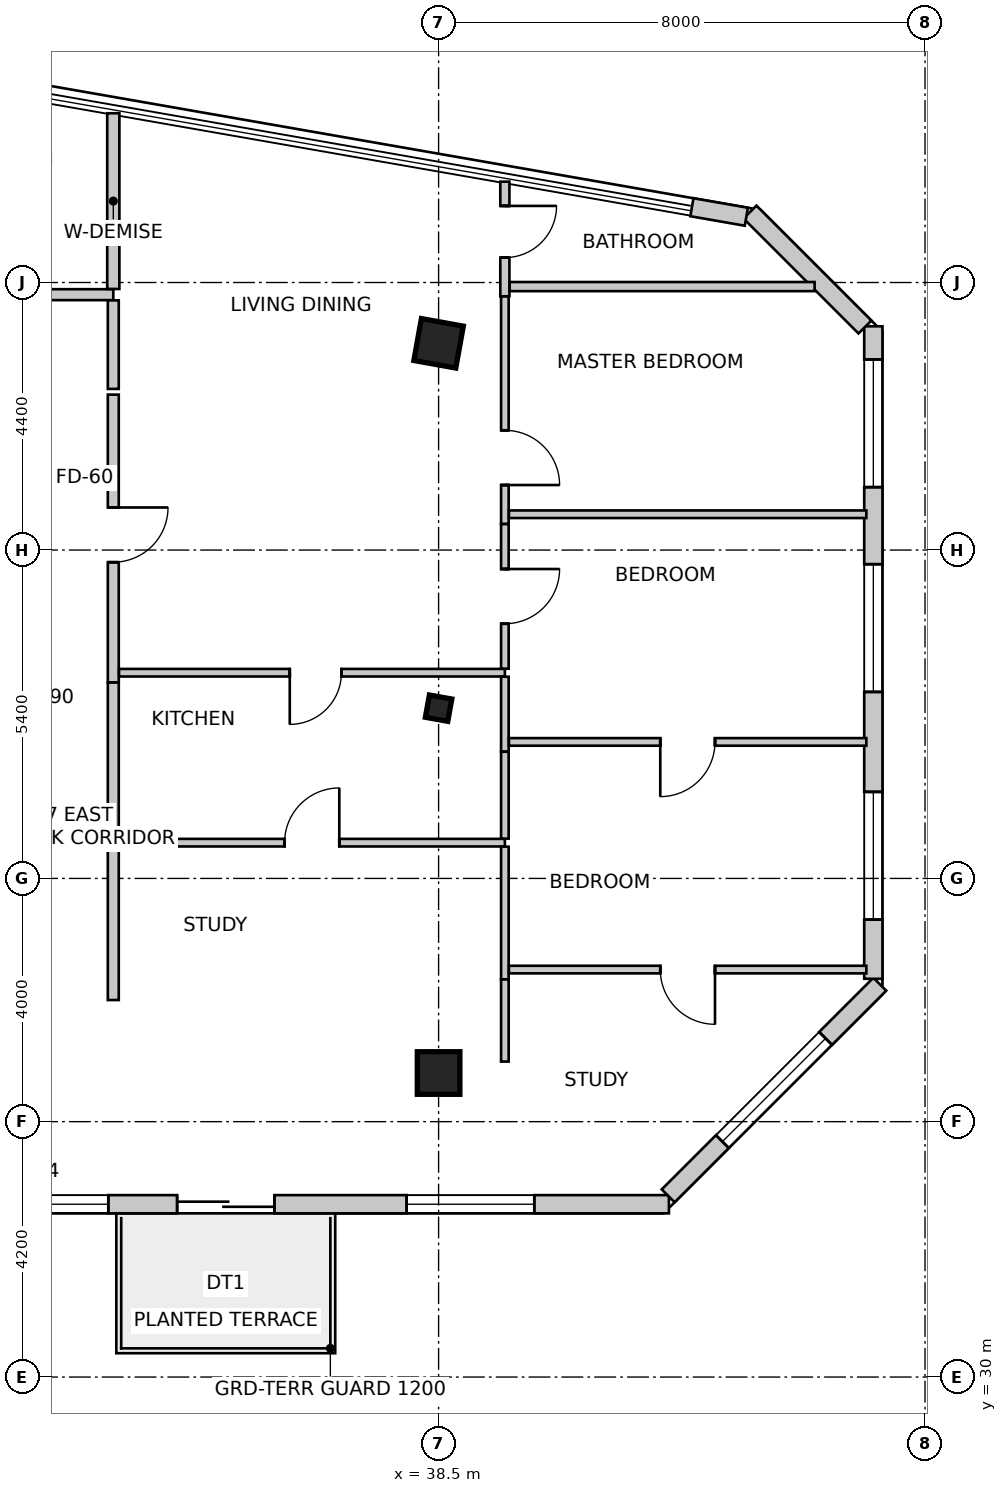
"""IFC4 building model, lengths in metres.
Left out: names, types, materials, properties, quantities, classifications, styles, units other than length and angle.
Written with IfcOpenShell. Run it as: python <this file> out.ifc"""

import sys

from ifc_helpers import new_model, si_unit, direction, frame, frame_2d, origin, origin_2d, place, context, subcontext, project, spatial, rectangle, i_section, extrude, source, transform, mapped, element, fill, save


model = new_model("IFC4")
c1 = context("Model", 3, precision=1e-05, world=origin(), true_north=direction((0.0, 1.0)))
c2 = subcontext(c1, "Body", "Model", "MODEL_VIEW")
j1 = project(units=[si_unit("LENGTHUNIT", "METRE"), si_unit("PLANEANGLEUNIT", "RADIAN")], contexts=[c1])
p1 = place(None, origin())
s1 = spatial("IfcSite", under=j1, at=p1, CompositionType="ELEMENT")
p2 = place(p1, origin())
s2 = spatial("IfcBuilding", under=s1, at=p2, CompositionType="ELEMENT")
p3 = place(p2, frame((0.0, 0.0, 225.4)))
s3 = spatial("IfcBuildingStorey", under=s2, at=p3, CompositionType="ELEMENT", Elevation=225.4)
m1 = source(origin(), c2, "Body", "SweptSolid", [
    extrude(rectangle(XDim=0.7, YDim=0.7, at=origin_2d()), origin(), (0.0, 0.0, 1.0), 3.5),
])
for number, where, z_axis, x_axis in (
    (1, (38.5, 47.0, 0.0), (0.0, 0.0, 1.0), (0.984, -0.177, 0.0)),
    (2, (38.5, 35.0, 0.0), (0.0, 0.0, 1.0), (1.0, 0.0, 0.0)),
):
    element("IfcColumn", number, at=place(p3, frame(where, z_axis=z_axis, x_axis=x_axis)), inside=s3, PredefinedType="COLUMN", context=c2, shape_type="MappedRepresentation", body=[
        mapped(m1, transform((0.0, 0.0, 0.0), scale=1.0)),
    ])
m2 = source(origin(), c2, "Body", "SweptSolid", [
    extrude(i_section(OverallWidth=0.374, OverallDepth=0.372, WebThickness=0.016, FlangeThickness=0.026, FilletRadius=0.015, at=origin_2d()), origin(), (0.0, 0.0, 1.0), 3.5),
])
p4 = place(p3, frame((38.5, 41.0, 0.0), z_axis=(0.0, 0.0, 1.0), x_axis=(0.984195607969, -0.17708474032, 0.0)))
e3 = element("IfcColumn", 3, at=p4, inside=s3, PredefinedType="COLUMN", context=c2, shape_type="MappedRepresentation", body=[
    mapped(m2, transform((0.0, 0.0, 0.0), scale=1.0)),
])
p5 = place(p3, frame((29.797, 32.842, 0.0), z_axis=(0.0, 0.0, 1.0), x_axis=(1.0, 0.0, 0.0)))
e4 = element("IfcWall", 4, at=p5, inside=s3, PredefinedType="SOLIDWALL", context=c2, shape_type="SweptSolid", body=[
    extrude(rectangle(XDim=12.491, YDim=0.3, at=frame_2d((6.245, 0.0))), origin(), (0.0, 0.0, 1.0), 3.25),
])
m3 = source(origin(), c2, "Body", "SweptSolid", [
    extrude(rectangle(XDim=1.6, YDim=2.15, at=frame_2d((0.8, 1.075))), frame((0.0, 0.16, 0.0), z_axis=(0.0, -1.0, 0.0), x_axis=(1.0, 0.0, 0.0)), (0.0, 0.0, 1.0), 0.32),
])
p6 = place(p5, frame((4.403, 0.0, 0.0)))
e5 = element("IfcOpeningElement", 5, at=p6, cuts=e4, PredefinedType="OPENING", context=c2, shape_type="MappedRepresentation", body=[
    mapped(m3, transform((0.0, 0.0, 0.0), scale=1.0)),
])
m4 = source(origin(), c2, "Body", "SweptSolid", [
    extrude(rectangle(XDim=2.1, YDim=2.0, at=frame_2d((1.05, 1.0))), frame((0.0, 0.16, 0.0), z_axis=(0.0, -1.0, 0.0), x_axis=(1.0, 0.0, 0.0)), (0.0, 0.0, 1.0), 0.32),
])
p7 = place(p5, frame((1.171, 0.0, 0.85)))
e6 = element("IfcOpeningElement", 6, at=p7, cuts=e4, PredefinedType="OPENING", context=c2, shape_type="MappedRepresentation", body=[
    mapped(m4, transform((0.0, 0.0, 0.0), scale=1.0)),
])
p8 = place(p5, frame((8.177, 0.0, 0.85)))
e7 = element("IfcOpeningElement", 7, at=p8, cuts=e4, PredefinedType="OPENING", context=c2, shape_type="MappedRepresentation", body=[
    mapped(m4, transform((0.0, 0.0, 0.0), scale=1.0)),
])
p9 = place(p3, frame((42.276, 32.98, 0.0), z_axis=(0.0, 0.0, 1.0), x_axis=(0.707106781187, 0.707106781187, 0.0)))
e8 = element("IfcWall", 8, at=p9, inside=s3, PredefinedType="SOLIDWALL", context=c2, shape_type="SweptSolid", body=[
    extrude(rectangle(XDim=4.922, YDim=0.3, at=frame_2d((2.461, 0.0))), origin(), (0.0, 0.0, 1.0), 3.25),
])
m5 = source(origin(), c2, "Body", "SweptSolid", [
    extrude(rectangle(XDim=2.4, YDim=2.2, at=frame_2d((1.2, 1.1))), frame((0.0, 0.16, 0.0), z_axis=(0.0, -1.0, 0.0), x_axis=(1.0, 0.0, 0.0)), (0.0, 0.0, 1.0), 0.32),
])
p10 = place(p9, frame((1.261, 0.0, 0.85)))
e9 = element("IfcOpeningElement", 9, at=p10, cuts=e8, PredefinedType="OPENING", context=c2, shape_type="MappedRepresentation", body=[
    mapped(m5, transform((0.0, 0.0, 0.0), scale=1.0)),
])
p11 = place(p3, frame((45.65, 36.549, 0.0), z_axis=(0.0, 0.0, 1.0), x_axis=(0.0, 1.0, 0.0)))
e10 = element("IfcWall", 10, at=p11, inside=s3, PredefinedType="SOLIDWALL", context=c2, shape_type="SweptSolid", body=[
    extrude(rectangle(XDim=10.73, YDim=0.3, at=frame_2d((5.365, 0.0))), origin(), (0.0, 0.0, 1.0), 3.25),
])
p12 = place(p11, frame((0.974, 0.0, 0.85)))
e11 = element("IfcOpeningElement", 11, at=p12, cuts=e10, PredefinedType="OPENING", context=c2, shape_type="MappedRepresentation", body=[
    mapped(m4, transform((0.0, 0.0, 0.0), scale=1.0)),
])
p13 = place(p11, frame((4.718, 0.0, 0.85)))
e12 = element("IfcOpeningElement", 12, at=p13, cuts=e10, PredefinedType="OPENING", context=c2, shape_type="MappedRepresentation", body=[
    mapped(m4, transform((0.0, 0.0, 0.0), scale=1.0)),
])
p14 = place(p11, frame((8.085, 0.0, 0.85)))
e13 = element("IfcOpeningElement", 13, at=p14, cuts=e10, PredefinedType="OPENING", context=c2, shape_type="MappedRepresentation", body=[
    mapped(m4, transform((0.0, 0.0, 0.0), scale=1.0)),
])
p15 = place(p3, frame((45.512, 47.268, 0.0), z_axis=(0.0, 0.0, 1.0), x_axis=(-0.707106781187, 0.707106781187, 0.0)))
e14 = element("IfcWall", 14, at=p15, inside=s3, PredefinedType="SOLIDWALL", context=c2, shape_type="SweptSolid", body=[
    extrude(rectangle(XDim=2.674, YDim=0.3, at=frame_2d((1.337, 0.0))), origin(), (0.0, 0.0, 1.0), 3.25),
])
p16 = place(p3, frame((43.561, 49.081, 0.0), z_axis=(0.0, 0.0, 1.0), x_axis=(-0.985063518612, 0.172191359539, 0.0)))
e15 = element("IfcWall", 15, at=p16, inside=s3, PredefinedType="SOLIDWALL", context=c2, shape_type="SweptSolid", body=[
    extrude(rectangle(XDim=0.909, YDim=0.3, at=frame_2d((0.455, 0.0))), origin(), (0.0, 0.0, 1.0), 3.25),
])
p17 = place(p3, frame((28.362, 47.8, 0.0), z_axis=(0.0, 0.0, 1.0), x_axis=(1.0, 0.0, 0.0)))
e16 = element("IfcWall", 16, at=p17, inside=s3, PredefinedType="PARTITIONING", context=c2, shape_type="SweptSolid", body=[
    extrude(rectangle(XDim=4.788, YDim=0.18, at=frame_2d((2.394, 0.0))), origin(), (0.0, 0.0, 1.0), 2.688),
])
m6 = source(origin(), c2, "Body", "SweptSolid", [
    extrude(rectangle(XDim=0.85, YDim=2.15, at=frame_2d((0.425, 1.075))), frame((0.0, 0.1, 0.0), z_axis=(0.0, -1.0, 0.0), x_axis=(1.0, 0.0, 0.0)), (0.0, 0.0, 1.0), 0.2),
])
p18 = place(p17, frame((0.401, 0.0, 0.0)))
e17 = element("IfcOpeningElement", 17, at=p18, cuts=e16, PredefinedType="OPENING", context=c2, shape_type="MappedRepresentation", body=[
    mapped(m6, transform((0.0, 0.0, 0.0), scale=1.0)),
])
p19 = place(p3, frame((33.15, 47.706, 0.0), z_axis=(0.0, 0.0, 1.0), x_axis=(0.0, -1.0, 0.0)))
e18 = element("IfcWall", 18, at=p19, inside=s3, PredefinedType="PARTITIONING", context=c2, shape_type="SweptSolid", body=[
    extrude(rectangle(XDim=1.456, YDim=0.18, at=frame_2d((0.728, 0.0))), origin(), (0.0, 0.0, 1.0), 2.835),
])
p20 = place(p3, frame((33.15, 38.948, 0.0), z_axis=(0.0, 0.0, 1.0), x_axis=(0.0, -1.0, 0.0)))
e19 = element("IfcWall", 19, at=p20, inside=s3, PredefinedType="PARTITIONING", context=c2, shape_type="SweptSolid", body=[
    extrude(rectangle(XDim=2.748, YDim=0.18, at=frame_2d((1.374, 0.0))), origin(), (0.0, 0.0, 1.0), 3.25),
])
p21 = place(p3, frame((33.15, 46.156, 0.0), z_axis=(0.0, 0.0, 1.0), x_axis=(0.0, -1.0, 0.0)))
e20 = element("IfcWall", 20, at=p21, inside=s3, PredefinedType="PARTITIONING", context=c2, shape_type="SweptSolid", body=[
    extrude(rectangle(XDim=4.733, YDim=0.18, at=frame_2d((2.366, 0.0))), origin(), (0.0, 0.0, 1.0), 2.688),
])
m7 = source(origin(), c2, "Body", "SweptSolid", [
    extrude(rectangle(XDim=0.9, YDim=2.15, at=frame_2d((0.45, 1.075))), frame((0.0, 0.1, 0.0), z_axis=(0.0, -1.0, 0.0), x_axis=(1.0, 0.0, 0.0)), (0.0, 0.0, 1.0), 0.2),
])
p22 = place(p21, frame((1.856, 0.0, 0.0)))
e21 = element("IfcOpeningElement", 21, at=p22, cuts=e20, PredefinedType="OPENING", context=c2, shape_type="MappedRepresentation", body=[
    mapped(m7, transform((0.0, 0.0, 0.0), scale=1.0)),
])
p23 = place(p3, frame((33.15, 41.421, 0.0), z_axis=(0.0, 0.0, 1.0), x_axis=(0.0, -1.0, 0.0)))
e22 = element("IfcWall", 22, at=p23, inside=s3, PredefinedType="PARTITIONING", context=c2, shape_type="SweptSolid", body=[
    extrude(rectangle(XDim=2.471, YDim=0.18, at=frame_2d((1.235, 0.0))), origin(), (0.0, 0.0, 1.0), 3.25),
])
p24 = place(p3, frame((33.15, 50.783, 0.0), z_axis=(0.0, 0.0, 1.0), x_axis=(0.0, -1.0, 0.0)))
e23 = element("IfcWall", 23, at=p24, inside=s3, PredefinedType="PARTITIONING", context=c2, shape_type="SweptSolid", body=[
    extrude(rectangle(XDim=2.889, YDim=0.2, at=frame_2d((1.445, 0.0))), origin(), (0.0, 0.0, 1.0), 2.542),
])
p25 = place(p3, frame((33.244, 38.788, 0.0), z_axis=(0.0, 0.0, 1.0), x_axis=(1.0, 0.0, 0.0)))
e24 = element("IfcWall", 24, at=p25, inside=s3, PredefinedType="PARTITIONING", context=c2, shape_type="SweptSolid", body=[
    extrude(rectangle(XDim=6.346, YDim=0.125, at=frame_2d((3.173, 0.0))), origin(), (0.0, 0.0, 1.0), 2.766),
])
m8 = source(origin(), c2, "Body", "SweptSolid", [
    extrude(rectangle(XDim=0.9, YDim=2.15, at=frame_2d((0.45, 1.075))), frame((0.0, 0.073, 0.0), z_axis=(0.0, -1.0, 0.0), x_axis=(1.0, 0.0, 0.0)), (0.0, 0.0, 1.0), 0.145),
])
p26 = place(p25, frame((2.723, 0.0, 0.0)))
e25 = element("IfcOpeningElement", 25, at=p26, cuts=e24, PredefinedType="OPENING", context=c2, shape_type="MappedRepresentation", body=[
    mapped(m8, transform((0.0, 0.0, 0.0), scale=1.0)),
])
p27 = place(p3, frame((39.59, 38.721, 0.0), z_axis=(0.0, 0.0, 1.0), x_axis=(0.0, -1.0, 0.0)))
e26 = element("IfcWall", 26, at=p27, inside=s3, PredefinedType="PARTITIONING", context=c2, shape_type="SweptSolid", body=[
    extrude(rectangle(XDim=2.18, YDim=0.125, at=frame_2d((1.09, 0.0))), origin(), (0.0, 0.0, 1.0), 3.25),
])
p28 = place(p3, frame((39.59, 36.539, 0.0), z_axis=(0.0, 0.0, 1.0), x_axis=(0.0, -1.0, 0.0)))
e27 = element("IfcWall", 27, at=p28, inside=s3, PredefinedType="PARTITIONING", context=c2, shape_type="SweptSolid", body=[
    extrude(rectangle(XDim=1.351, YDim=0.125, at=frame_2d((0.676, 0.0))), origin(), (0.0, 0.0, 1.0), 3.25),
])
p29 = place(p3, frame((39.59, 41.583, 0.0), z_axis=(0.0, 0.0, 1.0), x_axis=(-1.0, 0.0, 0.0)))
e28 = element("IfcWall", 28, at=p29, inside=s3, PredefinedType="PARTITIONING", context=c2, shape_type="SweptSolid", body=[
    extrude(rectangle(XDim=6.346, YDim=0.125, at=frame_2d((3.173, 0.0))), origin(), (0.0, 0.0, 1.0), 2.766),
])
m9 = source(origin(), c2, "Body", "SweptSolid", [
    extrude(rectangle(XDim=0.85, YDim=2.15, at=frame_2d((0.425, 1.075))), frame((0.0, 0.073, 0.0), z_axis=(0.0, -1.0, 0.0), x_axis=(1.0, 0.0, 0.0)), (0.0, 0.0, 1.0), 0.145),
])
p30 = place(p29, frame((2.688, 0.0, 0.0)))
e29 = element("IfcOpeningElement", 29, at=p30, cuts=e28, PredefinedType="OPENING", context=c2, shape_type="MappedRepresentation", body=[
    mapped(m9, transform((0.0, 0.0, 0.0), scale=1.0)),
])
p31 = place(p3, frame((39.59, 49.658, 0.0), z_axis=(0.0, 0.0, 1.0), x_axis=(0.0, -1.0, 0.0)))
e30 = element("IfcWall", 30, at=p31, inside=s3, PredefinedType="PARTITIONING", context=c2, shape_type="SweptSolid", body=[
    extrude(rectangle(XDim=1.885, YDim=0.15, at=frame_2d((0.943, 0.0))), origin(), (0.0, 0.0, 1.0), 3.25),
])
m10 = source(origin(), c2, "Body", "SweptSolid", [
    extrude(rectangle(XDim=0.85, YDim=2.15, at=frame_2d((0.425, 1.075))), frame((0.0, 0.085, 0.0), z_axis=(0.0, -1.0, 0.0), x_axis=(1.0, 0.0, 0.0)), (0.0, 0.0, 1.0), 0.17),
])
p32 = place(p31, frame((0.399, 0.0, 0.0)))
e31 = element("IfcOpeningElement", 31, at=p32, cuts=e30, PredefinedType="OPENING", context=c2, shape_type="MappedRepresentation", body=[
    mapped(m10, transform((0.0, 0.0, 0.0), scale=1.0)),
])
p33 = place(p3, frame((39.59, 47.771, 0.0), z_axis=(0.0, 0.0, 1.0), x_axis=(0.0, -1.0, 0.0)))
e32 = element("IfcWall", 32, at=p33, inside=s3, PredefinedType="PARTITIONING", context=c2, shape_type="SweptSolid", body=[
    extrude(rectangle(XDim=3.742, YDim=0.125, at=frame_2d((1.871, 0.0))), origin(), (0.0, 0.0, 1.0), 3.25),
])
p34 = place(p33, frame((2.202, 0.0, 0.0)))
e33 = element("IfcOpeningElement", 33, at=p34, cuts=e32, PredefinedType="OPENING", context=c2, shape_type="MappedRepresentation", body=[
    mapped(m8, transform((0.0, 0.0, 0.0), scale=1.0)),
])
p35 = place(p3, frame((39.59, 44.027, 0.0), z_axis=(0.0, 0.0, 1.0), x_axis=(0.0, -1.0, 0.0)))
e34 = element("IfcWall", 34, at=p35, inside=s3, PredefinedType="PARTITIONING", context=c2, shape_type="SweptSolid", body=[
    extrude(rectangle(XDim=2.378, YDim=0.125, at=frame_2d((1.189, 0.0))), origin(), (0.0, 0.0, 1.0), 3.25),
])
p36 = place(p35, frame((0.739, 0.0, 0.0)))
e35 = element("IfcOpeningElement", 35, at=p36, cuts=e34, PredefinedType="OPENING", context=c2, shape_type="MappedRepresentation", body=[
    mapped(m8, transform((0.0, 0.0, 0.0), scale=1.0)),
])
p37 = place(p3, frame((39.59, 41.517, 0.0), z_axis=(0.0, 0.0, 1.0), x_axis=(0.0, -1.0, 0.0)))
e36 = element("IfcWall", 36, at=p37, inside=s3, PredefinedType="PARTITIONING", context=c2, shape_type="SweptSolid", body=[
    extrude(rectangle(XDim=1.232, YDim=0.125, at=frame_2d((0.616, 0.0))), origin(), (0.0, 0.0, 1.0), 3.25),
])
p38 = place(p3, frame((39.59, 40.283, 0.0), z_axis=(0.0, 0.0, 1.0), x_axis=(0.0, -1.0, 0.0)))
e37 = element("IfcWall", 37, at=p38, inside=s3, PredefinedType="PARTITIONING", context=c2, shape_type="SweptSolid", body=[
    extrude(rectangle(XDim=1.428, YDim=0.125, at=frame_2d((0.714, 0.0))), origin(), (0.0, 0.0, 1.0), 3.25),
])
p39 = place(p3, frame((44.684, 47.933, 0.0), z_axis=(0.0, 0.0, 1.0), x_axis=(-1.0, 0.0, 0.0)))
e38 = element("IfcWall", 38, at=p39, inside=s3, PredefinedType="PARTITIONING", context=c2, shape_type="SweptSolid", body=[
    extrude(rectangle(XDim=5.015, YDim=0.15, at=frame_2d((2.508, 0.0))), origin(), (0.0, 0.0, 1.0), 3.25),
])
p40 = place(p3, frame((45.535, 44.189, 0.0), z_axis=(0.0, 0.0, 1.0), x_axis=(-1.0, 0.0, 0.0)))
e39 = element("IfcWall", 39, at=p40, inside=s3, PredefinedType="PARTITIONING", context=c2, shape_type="SweptSolid", body=[
    extrude(rectangle(XDim=5.878, YDim=0.125, at=frame_2d((2.939, 0.0))), origin(), (0.0, 0.0, 1.0), 3.25),
])
p41 = place(p3, frame((45.535, 40.445, 0.0), z_axis=(0.0, 0.0, 1.0), x_axis=(-1.0, 0.0, 0.0)))
e40 = element("IfcWall", 40, at=p41, inside=s3, PredefinedType="PARTITIONING", context=c2, shape_type="SweptSolid", body=[
    extrude(rectangle(XDim=5.878, YDim=0.125, at=frame_2d((2.939, 0.0))), origin(), (0.0, 0.0, 1.0), 3.25),
])
p42 = place(p41, frame((2.489, 0.0, 0.0)))
e41 = element("IfcOpeningElement", 41, at=p42, cuts=e40, PredefinedType="OPENING", context=c2, shape_type="MappedRepresentation", body=[
    mapped(m8, transform((0.0, 0.0, 0.0), scale=1.0)),
])
p43 = place(p3, frame((45.535, 36.701, 0.0), z_axis=(0.0, 0.0, 1.0), x_axis=(-1.0, 0.0, 0.0)))
e42 = element("IfcWall", 42, at=p43, inside=s3, PredefinedType="PARTITIONING", context=c2, shape_type="SweptSolid", body=[
    extrude(rectangle(XDim=5.878, YDim=0.125, at=frame_2d((2.939, 0.0))), origin(), (0.0, 0.0, 1.0), 3.25),
])
p44 = place(p43, frame((2.489, 0.0, 0.0)))
e43 = element("IfcOpeningElement", 43, at=p44, cuts=e42, PredefinedType="OPENING", context=c2, shape_type="MappedRepresentation", body=[
    mapped(m8, transform((0.0, 0.0, 0.0), scale=1.0)),
])
m11 = source(origin(), c2, "Body", "SweptSolid", [
    extrude(rectangle(XDim=1.6, YDim=2.15, at=frame_2d((0.8, 1.075))), frame((0.0, 0.025, 0.0), z_axis=(0.0, -1.0, 0.0), x_axis=(1.0, 0.0, 0.0)), (0.0, 0.0, 1.0), 0.05),
])
p45 = place(p6, origin())
e44 = element("IfcDoor", 44, at=p45, inside=s3, OperationType="DOUBLE_DOOR_SLIDING", PredefinedType="DOOR", context=c2, shape_type="MappedRepresentation", body=[
    mapped(m11, transform((0.0, 0.0, 0.0), scale=1.0)),
])
fill(e5, e44)
m12 = source(origin(), c2, "Body", "SweptSolid", [
    extrude(rectangle(XDim=2.1, YDim=2.0, at=frame_2d((1.05, 1.0))), frame((0.0, -0.015, 0.0), z_axis=(0.0, -1.0, 0.0), x_axis=(1.0, 0.0, 0.0)), (0.0, 0.0, 1.0), 0.06),
])
p46 = place(p7, origin())
e45 = element("IfcWindow", 45, at=p46, inside=s3, PartitioningType="SINGLE_PANEL", PredefinedType="WINDOW", context=c2, shape_type="MappedRepresentation", body=[
    mapped(m12, transform((0.0, 0.0, 0.0), scale=1.0)),
])
fill(e6, e45)
p47 = place(p8, origin())
e46 = element("IfcWindow", 46, at=p47, inside=s3, PartitioningType="SINGLE_PANEL", PredefinedType="WINDOW", context=c2, shape_type="MappedRepresentation", body=[
    mapped(m12, transform((0.0, 0.0, 0.0), scale=1.0)),
])
fill(e7, e46)
m13 = source(origin(), c2, "Body", "SweptSolid", [
    extrude(rectangle(XDim=2.4, YDim=2.2, at=frame_2d((1.2, 1.1))), frame((0.0, -0.015, 0.0), z_axis=(0.0, -1.0, 0.0), x_axis=(1.0, 0.0, 0.0)), (0.0, 0.0, 1.0), 0.06),
])
p48 = place(p10, origin())
e47 = element("IfcWindow", 47, at=p48, inside=s3, PartitioningType="SINGLE_PANEL", PredefinedType="WINDOW", context=c2, shape_type="MappedRepresentation", body=[
    mapped(m13, transform((0.0, 0.0, 0.0), scale=1.0)),
])
fill(e9, e47)
p49 = place(p12, origin())
e48 = element("IfcWindow", 48, at=p49, inside=s3, PartitioningType="SINGLE_PANEL", PredefinedType="WINDOW", context=c2, shape_type="MappedRepresentation", body=[
    mapped(m12, transform((0.0, 0.0, 0.0), scale=1.0)),
])
fill(e11, e48)
p50 = place(p13, origin())
e49 = element("IfcWindow", 49, at=p50, inside=s3, PartitioningType="SINGLE_PANEL", PredefinedType="WINDOW", context=c2, shape_type="MappedRepresentation", body=[
    mapped(m12, transform((0.0, 0.0, 0.0), scale=1.0)),
])
fill(e12, e49)
p51 = place(p14, origin())
e50 = element("IfcWindow", 50, at=p51, inside=s3, PartitioningType="SINGLE_PANEL", PredefinedType="WINDOW", context=c2, shape_type="MappedRepresentation", body=[
    mapped(m12, transform((0.0, 0.0, 0.0), scale=1.0)),
])
fill(e13, e50)
m14 = source(origin(), c2, "Body", "SweptSolid", [
    extrude(rectangle(XDim=0.9, YDim=2.15, at=frame_2d((0.45, 1.075))), frame((0.0, 0.025, 0.0), z_axis=(0.0, -1.0, 0.0), x_axis=(1.0, 0.0, 0.0)), (0.0, 0.0, 1.0), 0.05),
])
p52 = place(p26, origin())
e51 = element("IfcDoor", 51, at=p52, inside=s3, OperationType="SINGLE_SWING_RIGHT", PredefinedType="DOOR", context=c2, shape_type="MappedRepresentation", body=[
    mapped(m14, transform((0.0, 0.0, 0.0), scale=1.0)),
])
fill(e25, e51)
m15 = source(origin(), c2, "Body", "SweptSolid", [
    extrude(rectangle(XDim=0.9, YDim=2.15, at=frame_2d((0.45, 1.075))), frame((0.0, 0.025, 0.0), z_axis=(0.0, -1.0, 0.0), x_axis=(1.0, 0.0, 0.0)), (0.0, 0.0, 1.0), 0.05),
])
p53 = place(p22, origin())
e52 = element("IfcDoor", 52, at=p53, inside=s3, OperationType="SINGLE_SWING_LEFT", PredefinedType="DOOR", context=c2, shape_type="MappedRepresentation", body=[
    mapped(m15, transform((0.0, 0.0, 0.0), scale=1.0)),
])
fill(e21, e52)
m16 = source(origin(), c2, "Body", "SweptSolid", [
    extrude(rectangle(XDim=0.85, YDim=2.15, at=frame_2d((0.425, 1.075))), frame((0.0, 0.025, 0.0), z_axis=(0.0, -1.0, 0.0), x_axis=(1.0, 0.0, 0.0)), (0.0, 0.0, 1.0), 0.05),
])
p54 = place(p30, origin())
e53 = element("IfcDoor", 53, at=p54, inside=s3, OperationType="SINGLE_SWING_RIGHT", PredefinedType="DOOR", context=c2, shape_type="MappedRepresentation", body=[
    mapped(m16, transform((0.0, 0.0, 0.0), scale=1.0)),
])
fill(e29, e53)
p55 = place(p32, origin())
e54 = element("IfcDoor", 54, at=p55, inside=s3, OperationType="SINGLE_SWING_LEFT", PredefinedType="DOOR", context=c2, shape_type="MappedRepresentation", body=[
    mapped(m16, transform((0.0, 0.0, 0.0), scale=1.0)),
])
fill(e31, e54)
p56 = place(p34, origin())
e55 = element("IfcDoor", 55, at=p56, inside=s3, OperationType="SINGLE_SWING_RIGHT", PredefinedType="DOOR", context=c2, shape_type="MappedRepresentation", body=[
    mapped(m14, transform((0.0, 0.0, 0.0), scale=1.0)),
])
fill(e33, e55)
p57 = place(p36, origin())
e56 = element("IfcDoor", 56, at=p57, inside=s3, OperationType="SINGLE_SWING_LEFT", PredefinedType="DOOR", context=c2, shape_type="MappedRepresentation", body=[
    mapped(m14, transform((0.0, 0.0, 0.0), scale=1.0)),
])
fill(e35, e56)
p58 = place(p42, origin())
e57 = element("IfcDoor", 57, at=p58, inside=s3, OperationType="SINGLE_SWING_RIGHT", PredefinedType="DOOR", context=c2, shape_type="MappedRepresentation", body=[
    mapped(m14, transform((0.0, 0.0, 0.0), scale=1.0)),
])
fill(e41, e57)
p59 = place(p44, origin())
e58 = element("IfcDoor", 58, at=p59, inside=s3, OperationType="SINGLE_SWING_LEFT", PredefinedType="DOOR", context=c2, shape_type="MappedRepresentation", body=[
    mapped(m14, transform((0.0, 0.0, 0.0), scale=1.0)),
])
fill(e43, e58)
save(model, sys.argv[1])
